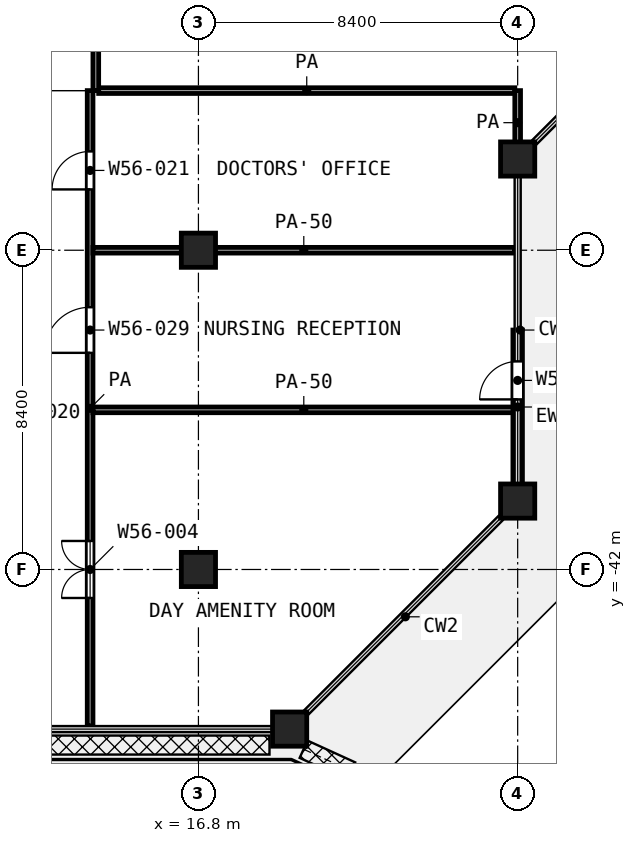
"""IFC4 building model, lengths in metres.
Left out: names, types, materials, properties, quantities, classifications, styles, units other than length and angle.
Written with IfcOpenShell. Run it as: python <this file> out.ifc"""

import sys

from ifc_helpers import new_model, si_unit, direction, frame, frame_2d, origin, origin_2d, place, context, subcontext, project, spatial, rectangle, extrude, element, fill, save


model = new_model("IFC4")
c1 = context("Model", 3, precision=1e-05, world=origin(), true_north=direction((0.0, 1.0)))
c2 = subcontext(c1, "Body", "Model", "MODEL_VIEW")
j1 = project(units=[si_unit("LENGTHUNIT", "METRE"), si_unit("PLANEANGLEUNIT", "RADIAN")], contexts=[c1])
p1 = place(None, origin())
s1 = spatial("IfcSite", under=j1, at=p1, CompositionType="ELEMENT")
p2 = place(p1, origin())
s2 = spatial("IfcBuilding", under=s1, at=p2, CompositionType="ELEMENT")
p3 = place(p2, frame((0.0, 0.0, 264.2)))
s3 = spatial("IfcBuildingStorey", under=s2, at=p3, CompositionType="ELEMENT", Elevation=264.2)
for number, where, z_axis, x_axis in (
    (1, (25.2, -31.2, 0.0), (0.0, 0.0, 1.0), (1.0, 0.0, 0.0)),
    (2, (16.8, -33.6, 0.0), (0.0, 0.0, 1.0), (1.0, 0.0, 0.0)),
    (3, (25.2, -40.2, 0.0), (0.0, 0.0, 1.0), (1.0, 0.0, 0.0)),
    (4, (16.8, -42.0, 0.0), (0.0, 0.0, 1.0), (1.0, 0.0, 0.0)),
    (5, (19.2, -46.2, 0.0), (0.0, 0.0, 1.0), (1.0, 0.0, 0.0)),
):
    element("IfcColumn", number, at=place(p3, frame(where, z_axis=z_axis, x_axis=x_axis)), inside=s3, PredefinedType="COLUMN", context=c2, shape_type="SweptSolid", body=[
        extrude(rectangle(XDim=0.9, YDim=0.9, at=origin_2d()), origin(), (0.0, 0.0, 1.0), 4.2),
    ])
p4 = place(p3, frame((25.2, -39.75, 0.0), z_axis=(0.0, 0.0, 1.0), x_axis=(0.0, 1.0, 0.0)))
e6 = element("IfcWall", 6, at=p4, inside=s3, PredefinedType="SOLIDWALL", context=c2, shape_type="SweptSolid", body=[
    extrude(rectangle(XDim=4.05, YDim=0.25, at=frame_2d((2.025, 0.0))), origin(), (0.0, 0.0, 1.0), 2.58),
])
p5 = place(p4, frame((2.225, 0.0, 0.0)))
e7 = element("IfcOpeningElement", 7, at=p5, cuts=e6, PredefinedType="OPENING", context=c2, shape_type="SweptSolid", body=[
    extrude(rectangle(XDim=1.0, YDim=2.1, at=frame_2d((0.5, 1.05))), frame((0.0, 0.135, 0.0), z_axis=(0.0, -1.0, 0.0), x_axis=(1.0, 0.0, 0.0)), (0.0, 0.0, 1.0), 0.27),
])
for number, where, z_axis, x_axis in (
    (8, (14.025, -37.8, 0.0), (0.0, 0.0, 1.0), (1.0, 0.0, 0.0)),
    (9, (14.025, -33.6, 0.0), (0.0, 0.0, 1.0), (1.0, 0.0, 0.0)),
):
    element("IfcWall", number, at=place(p3, frame(where, z_axis=z_axis, x_axis=x_axis)), inside=s3, PredefinedType="PARTITIONING", context=c2, shape_type="SweptSolid", body=[
        extrude(rectangle(XDim=11.095, YDim=0.15, at=frame_2d((5.548, 0.0))), origin(), (0.0, 0.0, 1.0), 2.7),
    ])
p6 = place(p3, frame((14.175, -29.4, 0.0), z_axis=(0.0, 0.0, 1.0), x_axis=(1.0, 0.0, 0.0)))
e10 = element("IfcWall", 10, at=p6, inside=s3, PredefinedType="PARTITIONING", context=c2, shape_type="SweptSolid", body=[
    extrude(rectangle(XDim=10.95, YDim=0.15, at=frame_2d((5.475, 0.0))), origin(), (0.0, 0.0, 1.0), 3.6),
])
p7 = place(p3, frame((13.95, -46.12, 0.0), z_axis=(0.0, 0.0, 1.0), x_axis=(0.0, 1.0, 0.0)))
e11 = element("IfcWall", 11, at=p7, inside=s3, PredefinedType="PARTITIONING", context=c2, shape_type="SweptSolid", body=[
    extrude(rectangle(XDim=16.72, YDim=0.15, at=frame_2d((8.36, 0.0))), origin(), (0.0, 0.0, 1.0), 3.6),
])
p8 = place(p7, frame((14.12, 0.0, 0.0)))
e12 = element("IfcOpeningElement", 12, at=p8, cuts=e11, PredefinedType="OPENING", context=c2, shape_type="SweptSolid", body=[
    extrude(rectangle(XDim=1.0, YDim=2.1, at=frame_2d((0.5, 1.05))), frame((0.0, 0.085, 0.0), z_axis=(0.0, -1.0, 0.0), x_axis=(1.0, 0.0, 0.0)), (0.0, 0.0, 1.0), 0.17),
])
p9 = place(p7, frame((9.82, 0.0, 0.0)))
e13 = element("IfcOpeningElement", 13, at=p9, cuts=e11, PredefinedType="OPENING", context=c2, shape_type="SweptSolid", body=[
    extrude(rectangle(XDim=1.2, YDim=2.1, at=frame_2d((0.6, 1.05))), frame((0.0, 0.085, 0.0), z_axis=(0.0, -1.0, 0.0), x_axis=(1.0, 0.0, 0.0)), (0.0, 0.0, 1.0), 0.17),
])
p10 = place(p7, frame((3.37, 0.0, 0.0)))
e14 = element("IfcOpeningElement", 14, at=p10, cuts=e11, PredefinedType="OPENING", context=c2, shape_type="SweptSolid", body=[
    extrude(rectangle(XDim=1.5, YDim=2.1, at=frame_2d((0.75, 1.05))), frame((0.0, 0.085, 0.0), z_axis=(0.0, -1.0, 0.0), x_axis=(1.0, 0.0, 0.0)), (0.0, 0.0, 1.0), 0.17),
])
p11 = place(p3, frame((14.1, -29.4, 0.0), z_axis=(0.0, 0.0, 1.0), x_axis=(0.0, 1.0, 0.0)))
e15 = element("IfcWall", 15, at=p11, inside=s3, PredefinedType="PARTITIONING", context=c2, shape_type="SweptSolid", body=[
    extrude(rectangle(XDim=4.6, YDim=0.15, at=frame_2d((2.3, 0.0))), origin(), (0.0, 0.0, 1.0), 3.6),
])
p12 = place(p3, frame((25.2, -31.087, 0.0), z_axis=(0.0, 0.0, 1.0), x_axis=(0.0, 1.0, 0.0)))
e16 = element("IfcWall", 16, at=p12, inside=s3, PredefinedType="PARTITIONING", context=c2, shape_type="SweptSolid", body=[
    extrude(rectangle(XDim=1.687, YDim=0.15, at=frame_2d((0.844, 0.0))), origin(), (0.0, 0.0, 1.0), 3.6),
])
p13 = place(p5, origin())
e17 = element("IfcDoor", 17, at=p13, inside=s3, OperationType="SINGLE_SWING_LEFT", PredefinedType="DOOR", context=c2, shape_type="SweptSolid", body=[
    extrude(rectangle(XDim=1.0, YDim=2.1, at=frame_2d((0.5, 1.05))), frame((0.0, 0.025, 0.0), z_axis=(0.0, -1.0, 0.0), x_axis=(1.0, 0.0, 0.0)), (0.0, 0.0, 1.0), 0.05),
])
fill(e7, e17)
p14 = place(p8, origin())
e18 = element("IfcDoor", 18, at=p14, inside=s3, OperationType="SINGLE_SWING_LEFT", PredefinedType="DOOR", context=c2, shape_type="SweptSolid", body=[
    extrude(rectangle(XDim=1.0, YDim=2.1, at=frame_2d((0.5, 1.05))), frame((0.0, 0.025, 0.0), z_axis=(0.0, -1.0, 0.0), x_axis=(1.0, 0.0, 0.0)), (0.0, 0.0, 1.0), 0.05),
])
fill(e12, e18)
p15 = place(p9, origin())
e19 = element("IfcDoor", 19, at=p15, inside=s3, OperationType="SINGLE_SWING_LEFT", PredefinedType="DOOR", context=c2, shape_type="SweptSolid", body=[
    extrude(rectangle(XDim=1.2, YDim=2.1, at=frame_2d((0.6, 1.05))), frame((0.0, 0.025, 0.0), z_axis=(0.0, -1.0, 0.0), x_axis=(1.0, 0.0, 0.0)), (0.0, 0.0, 1.0), 0.05),
])
fill(e13, e19)
p16 = place(p10, origin())
e20 = element("IfcDoor", 20, at=p16, inside=s3, OperationType="DOUBLE_DOOR_SINGLE_SWING", PredefinedType="DOOR", context=c2, shape_type="SweptSolid", body=[
    extrude(rectangle(XDim=1.5, YDim=2.1, at=frame_2d((0.75, 1.05))), frame((0.0, 0.025, 0.0), z_axis=(0.0, -1.0, 0.0), x_axis=(1.0, 0.0, 0.0)), (0.0, 0.0, 1.0), 0.05),
])
fill(e14, e20)
save(model, sys.argv[1])
